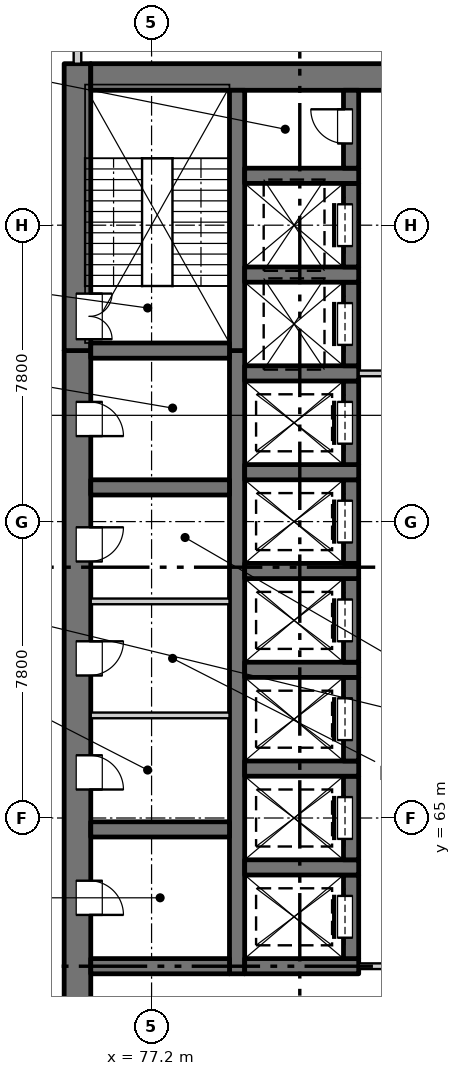
"""IFC4 building model, lengths in metres.
Left out: names, types, materials, properties, quantities, classifications, styles, units other than length and angle.
Written with IfcOpenShell. Run it as: python <this file> out.ifc"""

import sys

from ifc_helpers import new_model, si_unit, direction, frame, frame_2d, origin, place, context, subcontext, project, spatial, rectangle, extrude, element, fill, save


model = new_model("IFC4")
c1 = context("Model", 3, precision=1e-05, world=origin(), true_north=direction((0.0, 1.0)))
c2 = subcontext(c1, "Body", "Model", "MODEL_VIEW")
j1 = project(units=[si_unit("LENGTHUNIT", "METRE"), si_unit("PLANEANGLEUNIT", "RADIAN")], contexts=[c1])
p1 = place(None, origin())
s1 = spatial("IfcSite", under=j1, at=p1, CompositionType="ELEMENT")
p2 = place(p1, origin())
s2 = spatial("IfcBuilding", under=s1, at=p2, CompositionType="ELEMENT")
p3 = place(p2, frame((0.0, 0.0, 10.5)))
s3 = spatial("IfcBuildingStorey", under=s2, at=p3, CompositionType="ELEMENT", Elevation=10.5)
p4 = place(p3, frame((75.25, 54.9, -0.3), z_axis=(0.0, 0.0, 1.0), x_axis=(0.0, 1.0, 0.0)))
e1 = element("IfcWall", 1, at=p4, inside=s3, PredefinedType="SOLIDWALL", context=c2, shape_type="SweptSolid", body=[
    extrude(rectangle(XDim=22.4, YDim=0.7, at=frame_2d((11.2, 0.0))), origin(), (0.0, 0.0, 1.0), 4.45),
])
p5 = place(p4, frame((7.55, 0.0, 0.3)))
e2 = element("IfcOpeningElement", 2, at=p5, cuts=e1, PredefinedType="OPENING", context=c2, shape_type="SweptSolid", body=[
    extrude(rectangle(XDim=0.9, YDim=2.1, at=frame_2d((0.45, 1.05))), frame((0.0, 0.36, 0.0), z_axis=(0.0, -1.0, 0.0), x_axis=(1.0, 0.0, 0.0)), (0.0, 0.0, 1.0), 0.72),
])
p6 = place(p4, frame((10.85, 0.0, 0.3)))
e3 = element("IfcOpeningElement", 3, at=p6, cuts=e1, PredefinedType="OPENING", context=c2, shape_type="SweptSolid", body=[
    extrude(rectangle(XDim=0.9, YDim=2.1, at=frame_2d((0.45, 1.05))), frame((0.0, 0.36, 0.0), z_axis=(0.0, -1.0, 0.0), x_axis=(1.0, 0.0, 0.0)), (0.0, 0.0, 1.0), 0.72),
])
p7 = place(p4, frame((13.85, 0.0, 0.3)))
e4 = element("IfcOpeningElement", 4, at=p7, cuts=e1, PredefinedType="OPENING", context=c2, shape_type="SweptSolid", body=[
    extrude(rectangle(XDim=0.9, YDim=2.1, at=frame_2d((0.45, 1.05))), frame((0.0, 0.36, 0.0), z_axis=(0.0, -1.0, 0.0), x_axis=(1.0, 0.0, 0.0)), (0.0, 0.0, 1.0), 0.72),
])
p8 = place(p4, frame((16.85, 0.0, 0.3)))
e5 = element("IfcOpeningElement", 5, at=p8, cuts=e1, PredefinedType="OPENING", context=c2, shape_type="SweptSolid", body=[
    extrude(rectangle(XDim=0.9, YDim=2.1, at=frame_2d((0.45, 1.05))), frame((0.0, 0.36, 0.0), z_axis=(0.0, -1.0, 0.0), x_axis=(1.0, 0.0, 0.0)), (0.0, 0.0, 1.0), 0.72),
])
p9 = place(p4, frame((20.15, 0.0, 0.3)))
e6 = element("IfcOpeningElement", 6, at=p9, cuts=e1, PredefinedType="OPENING", context=c2, shape_type="SweptSolid", body=[
    extrude(rectangle(XDim=0.9, YDim=2.1, at=frame_2d((0.45, 1.05))), frame((0.0, 0.36, 0.0), z_axis=(0.0, -1.0, 0.0), x_axis=(1.0, 0.0, 0.0)), (0.0, 0.0, 1.0), 0.72),
])
p10 = place(p3, frame((75.25, 77.3, -0.3), z_axis=(0.0, 0.0, 1.0), x_axis=(0.0, 1.0, 0.0)))
e7 = element("IfcWall", 7, at=p10, inside=s3, PredefinedType="SOLIDWALL", context=c2, shape_type="SweptSolid", body=[
    extrude(rectangle(XDim=7.55, YDim=0.7, at=frame_2d((3.775, 0.0))), origin(), (0.0, 0.0, 1.0), 4.45),
])
p11 = place(p10, frame((0.3, 0.0, 0.3)))
e8 = element("IfcOpeningElement", 8, at=p11, cuts=e7, PredefinedType="OPENING", context=c2, shape_type="SweptSolid", body=[
    extrude(rectangle(XDim=1.2, YDim=2.1, at=frame_2d((0.6, 1.05))), frame((0.0, 0.36, 0.0), z_axis=(0.0, -1.0, 0.0), x_axis=(1.0, 0.0, 0.0)), (0.0, 0.0, 1.0), 0.72),
])
p12 = place(p3, frame((75.6, 84.5, -0.3), z_axis=(0.0, 0.0, 1.0), x_axis=(1.0, 0.0, 0.0)))
e9 = element("IfcWall", 9, at=p12, inside=s3, PredefinedType="SOLIDWALL", context=c2, shape_type="SweptSolid", body=[
    extrude(rectangle(XDim=18.8, YDim=0.7, at=frame_2d((9.4, 0.0))), origin(), (0.0, 0.0, 1.0), 4.45),
])
p13 = place(p3, frame((79.45, 60.9, -0.3), z_axis=(0.0, 0.0, 1.0), x_axis=(0.0, 1.0, 0.0)))
e10 = element("IfcWall", 10, at=p13, inside=s3, PredefinedType="SOLIDWALL", context=c2, shape_type="SweptSolid", body=[
    extrude(rectangle(XDim=16.4, YDim=0.4, at=frame_2d((8.2, 0.0))), origin(), (0.0, 0.0, 1.0), 4.45),
])
p14 = place(p3, frame((79.45, 77.3, -0.3), z_axis=(0.0, 0.0, 1.0), x_axis=(0.0, 1.0, 0.0)))
e11 = element("IfcWall", 11, at=p14, inside=s3, PredefinedType="SOLIDWALL", context=c2, shape_type="SweptSolid", body=[
    extrude(rectangle(XDim=6.85, YDim=0.4, at=frame_2d((3.425, 0.0))), origin(), (0.0, 0.0, 1.0), 4.45),
])
p15 = place(p3, frame((79.65, 61.1, -0.3), z_axis=(0.0, 0.0, 1.0), x_axis=(1.0, 0.0, 0.0)))
e12 = element("IfcWall", 12, at=p15, inside=s3, PredefinedType="SOLIDWALL", context=c2, shape_type="SweptSolid", body=[
    extrude(rectangle(XDim=3.0, YDim=0.4, at=frame_2d((1.5, 0.0))), origin(), (0.0, 0.0, 1.0), 4.45),
])
p16 = place(p3, frame((82.45, 61.3, -0.3), z_axis=(0.0, 0.0, 1.0), x_axis=(0.0, 1.0, 0.0)))
e13 = element("IfcWall", 13, at=p16, inside=s3, PredefinedType="SOLIDWALL", context=c2, shape_type="SweptSolid", body=[
    extrude(rectangle(XDim=2.2, YDim=0.4, at=frame_2d((1.1, 0.0))), origin(), (0.0, 0.0, 1.0), 4.45),
])
p17 = place(p16, frame((0.55, 0.0, 0.3)))
e14 = element("IfcOpeningElement", 14, at=p17, cuts=e13, PredefinedType="OPENING", context=c2, shape_type="SweptSolid", body=[
    extrude(rectangle(XDim=1.1, YDim=2.1, at=frame_2d((0.55, 1.05))), frame((0.0, 0.21, 0.0), z_axis=(0.0, -1.0, 0.0), x_axis=(1.0, 0.0, 0.0)), (0.0, 0.0, 1.0), 0.42),
])
p18 = place(p3, frame((79.65, 63.7, -0.3), z_axis=(0.0, 0.0, 1.0), x_axis=(1.0, 0.0, 0.0)))
e15 = element("IfcWall", 15, at=p18, inside=s3, PredefinedType="SOLIDWALL", context=c2, shape_type="SweptSolid", body=[
    extrude(rectangle(XDim=3.0, YDim=0.4, at=frame_2d((1.5, 0.0))), origin(), (0.0, 0.0, 1.0), 4.45),
])
p19 = place(p3, frame((82.45, 63.9, -0.3), z_axis=(0.0, 0.0, 1.0), x_axis=(0.0, 1.0, 0.0)))
e16 = element("IfcWall", 16, at=p19, inside=s3, PredefinedType="SOLIDWALL", context=c2, shape_type="SweptSolid", body=[
    extrude(rectangle(XDim=2.2, YDim=0.4, at=frame_2d((1.1, 0.0))), origin(), (0.0, 0.0, 1.0), 4.45),
])
p20 = place(p19, frame((0.55, 0.0, 0.3)))
e17 = element("IfcOpeningElement", 17, at=p20, cuts=e16, PredefinedType="OPENING", context=c2, shape_type="SweptSolid", body=[
    extrude(rectangle(XDim=1.1, YDim=2.1, at=frame_2d((0.55, 1.05))), frame((0.0, 0.21, 0.0), z_axis=(0.0, -1.0, 0.0), x_axis=(1.0, 0.0, 0.0)), (0.0, 0.0, 1.0), 0.42),
])
p21 = place(p3, frame((79.65, 66.3, -0.3), z_axis=(0.0, 0.0, 1.0), x_axis=(1.0, 0.0, 0.0)))
e18 = element("IfcWall", 18, at=p21, inside=s3, PredefinedType="SOLIDWALL", context=c2, shape_type="SweptSolid", body=[
    extrude(rectangle(XDim=3.0, YDim=0.4, at=frame_2d((1.5, 0.0))), origin(), (0.0, 0.0, 1.0), 4.45),
])
p22 = place(p3, frame((82.45, 66.5, -0.3), z_axis=(0.0, 0.0, 1.0), x_axis=(0.0, 1.0, 0.0)))
e19 = element("IfcWall", 19, at=p22, inside=s3, PredefinedType="SOLIDWALL", context=c2, shape_type="SweptSolid", body=[
    extrude(rectangle(XDim=2.2, YDim=0.4, at=frame_2d((1.1, 0.0))), origin(), (0.0, 0.0, 1.0), 4.45),
])
p23 = place(p22, frame((0.55, 0.0, 0.3)))
e20 = element("IfcOpeningElement", 20, at=p23, cuts=e19, PredefinedType="OPENING", context=c2, shape_type="SweptSolid", body=[
    extrude(rectangle(XDim=1.1, YDim=2.1, at=frame_2d((0.55, 1.05))), frame((0.0, 0.21, 0.0), z_axis=(0.0, -1.0, 0.0), x_axis=(1.0, 0.0, 0.0)), (0.0, 0.0, 1.0), 0.42),
])
p24 = place(p3, frame((79.65, 68.9, -0.3), z_axis=(0.0, 0.0, 1.0), x_axis=(1.0, 0.0, 0.0)))
e21 = element("IfcWall", 21, at=p24, inside=s3, PredefinedType="SOLIDWALL", context=c2, shape_type="SweptSolid", body=[
    extrude(rectangle(XDim=3.0, YDim=0.4, at=frame_2d((1.5, 0.0))), origin(), (0.0, 0.0, 1.0), 4.45),
])
p25 = place(p3, frame((82.45, 69.1, -0.3), z_axis=(0.0, 0.0, 1.0), x_axis=(0.0, 1.0, 0.0)))
e22 = element("IfcWall", 22, at=p25, inside=s3, PredefinedType="SOLIDWALL", context=c2, shape_type="SweptSolid", body=[
    extrude(rectangle(XDim=2.2, YDim=0.4, at=frame_2d((1.1, 0.0))), origin(), (0.0, 0.0, 1.0), 4.45),
])
p26 = place(p25, frame((0.55, 0.0, 0.3)))
e23 = element("IfcOpeningElement", 23, at=p26, cuts=e22, PredefinedType="OPENING", context=c2, shape_type="SweptSolid", body=[
    extrude(rectangle(XDim=1.1, YDim=2.1, at=frame_2d((0.55, 1.05))), frame((0.0, 0.21, 0.0), z_axis=(0.0, -1.0, 0.0), x_axis=(1.0, 0.0, 0.0)), (0.0, 0.0, 1.0), 0.42),
])
p27 = place(p3, frame((79.65, 71.5, -0.3), z_axis=(0.0, 0.0, 1.0), x_axis=(1.0, 0.0, 0.0)))
e24 = element("IfcWall", 24, at=p27, inside=s3, PredefinedType="SOLIDWALL", context=c2, shape_type="SweptSolid", body=[
    extrude(rectangle(XDim=3.0, YDim=0.4, at=frame_2d((1.5, 0.0))), origin(), (0.0, 0.0, 1.0), 4.45),
])
p28 = place(p3, frame((82.45, 71.7, -0.3), z_axis=(0.0, 0.0, 1.0), x_axis=(0.0, 1.0, 0.0)))
e25 = element("IfcWall", 25, at=p28, inside=s3, PredefinedType="SOLIDWALL", context=c2, shape_type="SweptSolid", body=[
    extrude(rectangle(XDim=2.2, YDim=0.4, at=frame_2d((1.1, 0.0))), origin(), (0.0, 0.0, 1.0), 4.45),
])
p29 = place(p28, frame((0.55, 0.0, 0.3)))
e26 = element("IfcOpeningElement", 26, at=p29, cuts=e25, PredefinedType="OPENING", context=c2, shape_type="SweptSolid", body=[
    extrude(rectangle(XDim=1.1, YDim=2.1, at=frame_2d((0.55, 1.05))), frame((0.0, 0.21, 0.0), z_axis=(0.0, -1.0, 0.0), x_axis=(1.0, 0.0, 0.0)), (0.0, 0.0, 1.0), 0.42),
])
p30 = place(p3, frame((79.65, 74.1, -0.3), z_axis=(0.0, 0.0, 1.0), x_axis=(1.0, 0.0, 0.0)))
e27 = element("IfcWall", 27, at=p30, inside=s3, PredefinedType="SOLIDWALL", context=c2, shape_type="SweptSolid", body=[
    extrude(rectangle(XDim=3.0, YDim=0.4, at=frame_2d((1.5, 0.0))), origin(), (0.0, 0.0, 1.0), 4.45),
])
p31 = place(p3, frame((82.45, 74.3, -0.3), z_axis=(0.0, 0.0, 1.0), x_axis=(0.0, 1.0, 0.0)))
e28 = element("IfcWall", 28, at=p31, inside=s3, PredefinedType="SOLIDWALL", context=c2, shape_type="SweptSolid", body=[
    extrude(rectangle(XDim=2.2, YDim=0.4, at=frame_2d((1.1, 0.0))), origin(), (0.0, 0.0, 1.0), 4.45),
])
p32 = place(p31, frame((0.55, 0.0, 0.3)))
e29 = element("IfcOpeningElement", 29, at=p32, cuts=e28, PredefinedType="OPENING", context=c2, shape_type="SweptSolid", body=[
    extrude(rectangle(XDim=1.1, YDim=2.1, at=frame_2d((0.55, 1.05))), frame((0.0, 0.21, 0.0), z_axis=(0.0, -1.0, 0.0), x_axis=(1.0, 0.0, 0.0)), (0.0, 0.0, 1.0), 0.42),
])
p33 = place(p3, frame((79.65, 76.7, -0.3), z_axis=(0.0, 0.0, 1.0), x_axis=(1.0, 0.0, 0.0)))
e30 = element("IfcWall", 30, at=p33, inside=s3, PredefinedType="SOLIDWALL", context=c2, shape_type="SweptSolid", body=[
    extrude(rectangle(XDim=3.0, YDim=0.4, at=frame_2d((1.5, 0.0))), origin(), (0.0, 0.0, 1.0), 4.45),
])
p34 = place(p3, frame((82.45, 76.9, -0.3), z_axis=(0.0, 0.0, 1.0), x_axis=(0.0, 1.0, 0.0)))
e31 = element("IfcWall", 31, at=p34, inside=s3, PredefinedType="SOLIDWALL", context=c2, shape_type="SweptSolid", body=[
    extrude(rectangle(XDim=2.2, YDim=0.4, at=frame_2d((1.1, 0.0))), origin(), (0.0, 0.0, 1.0), 4.45),
])
p35 = place(p34, frame((0.55, 0.0, 0.3)))
e32 = element("IfcOpeningElement", 32, at=p35, cuts=e31, PredefinedType="OPENING", context=c2, shape_type="SweptSolid", body=[
    extrude(rectangle(XDim=1.1, YDim=2.1, at=frame_2d((0.55, 1.05))), frame((0.0, 0.21, 0.0), z_axis=(0.0, -1.0, 0.0), x_axis=(1.0, 0.0, 0.0)), (0.0, 0.0, 1.0), 0.42),
])
p36 = place(p3, frame((79.65, 79.3, -0.3), z_axis=(0.0, 0.0, 1.0), x_axis=(1.0, 0.0, 0.0)))
e33 = element("IfcWall", 33, at=p36, inside=s3, PredefinedType="SOLIDWALL", context=c2, shape_type="SweptSolid", body=[
    extrude(rectangle(XDim=3.0, YDim=0.4, at=frame_2d((1.5, 0.0))), origin(), (0.0, 0.0, 1.0), 4.45),
])
p37 = place(p3, frame((82.45, 79.5, -0.3), z_axis=(0.0, 0.0, 1.0), x_axis=(0.0, 1.0, 0.0)))
e34 = element("IfcWall", 34, at=p37, inside=s3, PredefinedType="SOLIDWALL", context=c2, shape_type="SweptSolid", body=[
    extrude(rectangle(XDim=2.2, YDim=0.4, at=frame_2d((1.1, 0.0))), origin(), (0.0, 0.0, 1.0), 4.45),
])
p38 = place(p37, frame((0.55, 0.0, 0.3)))
e35 = element("IfcOpeningElement", 35, at=p38, cuts=e34, PredefinedType="OPENING", context=c2, shape_type="SweptSolid", body=[
    extrude(rectangle(XDim=1.1, YDim=2.1, at=frame_2d((0.55, 1.05))), frame((0.0, 0.21, 0.0), z_axis=(0.0, -1.0, 0.0), x_axis=(1.0, 0.0, 0.0)), (0.0, 0.0, 1.0), 0.42),
])
p39 = place(p3, frame((79.65, 81.9, -0.3), z_axis=(0.0, 0.0, 1.0), x_axis=(1.0, 0.0, 0.0)))
e36 = element("IfcWall", 36, at=p39, inside=s3, PredefinedType="SOLIDWALL", context=c2, shape_type="SweptSolid", body=[
    extrude(rectangle(XDim=3.0, YDim=0.4, at=frame_2d((1.5, 0.0))), origin(), (0.0, 0.0, 1.0), 4.45),
])
p40 = place(p3, frame((82.45, 82.1, -0.3), z_axis=(0.0, 0.0, 1.0), x_axis=(0.0, 1.0, 0.0)))
e37 = element("IfcWall", 37, at=p40, inside=s3, PredefinedType="SOLIDWALL", context=c2, shape_type="SweptSolid", body=[
    extrude(rectangle(XDim=2.05, YDim=0.4, at=frame_2d((1.025, 0.0))), origin(), (0.0, 0.0, 1.0), 4.45),
])
p41 = place(p40, frame((0.65, 0.0, 0.3)))
e38 = element("IfcOpeningElement", 38, at=p41, cuts=e37, PredefinedType="OPENING", context=c2, shape_type="SweptSolid", body=[
    extrude(rectangle(XDim=0.9, YDim=2.1, at=frame_2d((0.45, 1.05))), frame((0.0, 0.21, 0.0), z_axis=(0.0, -1.0, 0.0), x_axis=(1.0, 0.0, 0.0)), (0.0, 0.0, 1.0), 0.42),
])
for number, where, z_axis, x_axis in (
    (39, (75.6, 61.1, -0.3), (0.0, 0.0, 1.0), (1.0, 0.0, 0.0)),
    (40, (75.6, 64.7, -0.3), (0.0, 0.0, 1.0), (1.0, 0.0, 0.0)),
    (41, (75.6, 73.7, -0.3), (0.0, 0.0, 1.0), (1.0, 0.0, 0.0)),
    (42, (75.6, 77.3, -0.3), (0.0, 0.0, 1.0), (1.0, 0.0, 0.0)),
):
    element("IfcWall", number, at=place(p3, frame(where, z_axis=z_axis, x_axis=x_axis)), inside=s3, PredefinedType="SOLIDWALL", context=c2, shape_type="SweptSolid", body=[
        extrude(rectangle(XDim=3.65, YDim=0.4, at=frame_2d((1.825, 0.0))), origin(), (0.0, 0.0, 1.0), 4.45),
    ])
p42 = place(p3, frame((82.65, 61.1, 0.0), z_axis=(0.0, 0.0, 1.0), x_axis=(1.0, 0.0, 0.0)))
e43 = element("IfcWall", 43, at=p42, inside=s3, PredefinedType="PARTITIONING", context=c2, shape_type="SweptSolid", body=[
    extrude(rectangle(XDim=4.7, YDim=0.15, at=frame_2d((2.35, 0.0))), origin(), (0.0, 0.0, 1.0), 4.15),
])
p43 = place(p42, frame((1.45, 0.0, 0.0)))
e44 = element("IfcOpeningElement", 44, at=p43, cuts=e43, PredefinedType="OPENING", context=c2, shape_type="SweptSolid", body=[
    extrude(rectangle(XDim=1.8, YDim=2.1, at=frame_2d((0.9, 1.05))), frame((0.0, 0.085, 0.0), z_axis=(0.0, -1.0, 0.0), x_axis=(1.0, 0.0, 0.0)), (0.0, 0.0, 1.0), 0.17),
])
for number, where, z_axis, x_axis in (
    (45, (75.6, 67.7, 0.0), (0.0, 0.0, 1.0), (1.0, 0.0, 0.0)),
    (46, (75.6, 70.7, 0.0), (0.0, 0.0, 1.0), (1.0, 0.0, 0.0)),
):
    element("IfcWall", number, at=place(p3, frame(where, z_axis=z_axis, x_axis=x_axis)), inside=s3, PredefinedType="PARTITIONING", context=c2, shape_type="SweptSolid", body=[
        extrude(rectangle(XDim=3.65, YDim=0.15, at=frame_2d((1.825, 0.0))), origin(), (0.0, 0.0, 1.0), 4.15),
    ])
p44 = place(p3, frame((82.65, 76.7, 0.0), z_axis=(0.0, 0.0, 1.0), x_axis=(1.0, 0.0, 0.0)))
e47 = element("IfcWall", 47, at=p44, inside=s3, PredefinedType="PARTITIONING", context=c2, shape_type="SweptSolid", body=[
    extrude(rectangle(XDim=4.7, YDim=0.15, at=frame_2d((2.35, 0.0))), origin(), (0.0, 0.0, 1.0), 4.15),
])
p45 = place(p44, frame((1.45, 0.0, 0.0)))
e48 = element("IfcOpeningElement", 48, at=p45, cuts=e47, PredefinedType="OPENING", context=c2, shape_type="SweptSolid", body=[
    extrude(rectangle(XDim=1.8, YDim=2.1, at=frame_2d((0.9, 1.05))), frame((0.0, 0.085, 0.0), z_axis=(0.0, -1.0, 0.0), x_axis=(1.0, 0.0, 0.0)), (0.0, 0.0, 1.0), 0.17),
])
p46 = place(p3, frame((75.25, 84.85, 0.0), z_axis=(0.0, 0.0, 1.0), x_axis=(0.0, 1.0, 0.0)))
e49 = element("IfcWall", 49, at=p46, inside=s3, PredefinedType="PARTITIONING", context=c2, shape_type="SweptSolid", body=[
    extrude(rectangle(XDim=3.25, YDim=0.2, at=frame_2d((1.625, 0.0))), origin(), (0.0, 0.0, 1.0), 4.15),
])
p47 = place(p46, frame((1.15, 0.0, 0.0)))
e50 = element("IfcOpeningElement", 50, at=p47, cuts=e49, PredefinedType="OPENING", context=c2, shape_type="SweptSolid", body=[
    extrude(rectangle(XDim=0.9, YDim=2.1, at=frame_2d((0.45, 1.05))), frame((0.0, 0.11, 0.0), z_axis=(0.0, -1.0, 0.0), x_axis=(1.0, 0.0, 0.0)), (0.0, 0.0, 1.0), 0.22),
])
p48 = place(p17, origin())
e51 = element("IfcDoor", 51, at=p48, inside=s3, OperationType="SLIDING_TO_RIGHT", PredefinedType="DOOR", context=c2, shape_type="SweptSolid", body=[
    extrude(rectangle(XDim=1.1, YDim=2.1, at=frame_2d((0.55, 1.05))), frame((0.0, 0.185, 0.0), z_axis=(0.0, -1.0, 0.0), x_axis=(1.0, 0.0, 0.0)), (0.0, 0.0, 1.0), 0.05),
])
fill(e14, e51)
p49 = place(p5, origin())
e52 = element("IfcDoor", 52, at=p49, inside=s3, OperationType="SINGLE_SWING_RIGHT", PredefinedType="DOOR", context=c2, shape_type="SweptSolid", body=[
    extrude(rectangle(XDim=0.9, YDim=2.1, at=frame_2d((0.45, 1.05))), frame((0.0, -0.285, 0.0), z_axis=(0.0, -1.0, 0.0), x_axis=(1.0, 0.0, 0.0)), (0.0, 0.0, 1.0), 0.05),
])
fill(e2, e52)
p50 = place(p20, origin())
e53 = element("IfcDoor", 53, at=p50, inside=s3, OperationType="SLIDING_TO_RIGHT", PredefinedType="DOOR", context=c2, shape_type="SweptSolid", body=[
    extrude(rectangle(XDim=1.1, YDim=2.1, at=frame_2d((0.55, 1.05))), frame((0.0, 0.185, 0.0), z_axis=(0.0, -1.0, 0.0), x_axis=(1.0, 0.0, 0.0)), (0.0, 0.0, 1.0), 0.05),
])
fill(e17, e53)
p51 = place(p6, origin())
e54 = element("IfcDoor", 54, at=p51, inside=s3, OperationType="SINGLE_SWING_RIGHT", PredefinedType="DOOR", context=c2, shape_type="SweptSolid", body=[
    extrude(rectangle(XDim=0.9, YDim=2.1, at=frame_2d((0.45, 1.05))), frame((0.0, -0.285, 0.0), z_axis=(0.0, -1.0, 0.0), x_axis=(1.0, 0.0, 0.0)), (0.0, 0.0, 1.0), 0.05),
])
fill(e3, e54)
p52 = place(p23, origin())
e55 = element("IfcDoor", 55, at=p52, inside=s3, OperationType="SLIDING_TO_RIGHT", PredefinedType="DOOR", context=c2, shape_type="SweptSolid", body=[
    extrude(rectangle(XDim=1.1, YDim=2.1, at=frame_2d((0.55, 1.05))), frame((0.0, 0.185, 0.0), z_axis=(0.0, -1.0, 0.0), x_axis=(1.0, 0.0, 0.0)), (0.0, 0.0, 1.0), 0.05),
])
fill(e20, e55)
p53 = place(p7, origin())
e56 = element("IfcDoor", 56, at=p53, inside=s3, OperationType="SINGLE_SWING_LEFT", PredefinedType="DOOR", context=c2, shape_type="SweptSolid", body=[
    extrude(rectangle(XDim=0.9, YDim=2.1, at=frame_2d((0.45, 1.05))), frame((0.0, -0.285, 0.0), z_axis=(0.0, -1.0, 0.0), x_axis=(1.0, 0.0, 0.0)), (0.0, 0.0, 1.0), 0.05),
])
fill(e4, e56)
p54 = place(p26, origin())
e57 = element("IfcDoor", 57, at=p54, inside=s3, OperationType="SLIDING_TO_LEFT", PredefinedType="DOOR", context=c2, shape_type="SweptSolid", body=[
    extrude(rectangle(XDim=1.1, YDim=2.1, at=frame_2d((0.55, 1.05))), frame((0.0, 0.185, 0.0), z_axis=(0.0, -1.0, 0.0), x_axis=(1.0, 0.0, 0.0)), (0.0, 0.0, 1.0), 0.05),
])
fill(e23, e57)
p55 = place(p8, origin())
e58 = element("IfcDoor", 58, at=p55, inside=s3, OperationType="SINGLE_SWING_LEFT", PredefinedType="DOOR", context=c2, shape_type="SweptSolid", body=[
    extrude(rectangle(XDim=0.9, YDim=2.1, at=frame_2d((0.45, 1.05))), frame((0.0, -0.285, 0.0), z_axis=(0.0, -1.0, 0.0), x_axis=(1.0, 0.0, 0.0)), (0.0, 0.0, 1.0), 0.05),
])
fill(e5, e58)
p56 = place(p29, origin())
e59 = element("IfcDoor", 59, at=p56, inside=s3, OperationType="SLIDING_TO_LEFT", PredefinedType="DOOR", context=c2, shape_type="SweptSolid", body=[
    extrude(rectangle(XDim=1.1, YDim=2.1, at=frame_2d((0.55, 1.05))), frame((0.0, 0.185, 0.0), z_axis=(0.0, -1.0, 0.0), x_axis=(1.0, 0.0, 0.0)), (0.0, 0.0, 1.0), 0.05),
])
fill(e26, e59)
p57 = place(p32, origin())
e60 = element("IfcDoor", 60, at=p57, inside=s3, OperationType="SLIDING_TO_LEFT", PredefinedType="DOOR", context=c2, shape_type="SweptSolid", body=[
    extrude(rectangle(XDim=1.1, YDim=2.1, at=frame_2d((0.55, 1.05))), frame((0.0, 0.185, 0.0), z_axis=(0.0, -1.0, 0.0), x_axis=(1.0, 0.0, 0.0)), (0.0, 0.0, 1.0), 0.05),
])
fill(e29, e60)
p58 = place(p9, origin())
e61 = element("IfcDoor", 61, at=p58, inside=s3, OperationType="SINGLE_SWING_RIGHT", PredefinedType="DOOR", context=c2, shape_type="SweptSolid", body=[
    extrude(rectangle(XDim=0.9, YDim=2.1, at=frame_2d((0.45, 1.05))), frame((0.0, -0.285, 0.0), z_axis=(0.0, -1.0, 0.0), x_axis=(1.0, 0.0, 0.0)), (0.0, 0.0, 1.0), 0.05),
])
fill(e6, e61)
p59 = place(p35, origin())
e62 = element("IfcDoor", 62, at=p59, inside=s3, OperationType="SLIDING_TO_LEFT", PredefinedType="DOOR", context=c2, shape_type="SweptSolid", body=[
    extrude(rectangle(XDim=1.1, YDim=2.1, at=frame_2d((0.55, 1.05))), frame((0.0, 0.185, 0.0), z_axis=(0.0, -1.0, 0.0), x_axis=(1.0, 0.0, 0.0)), (0.0, 0.0, 1.0), 0.05),
])
fill(e32, e62)
p60 = place(p11, origin())
e63 = element("IfcDoor", 63, at=p60, inside=s3, OperationType="DOUBLE_DOOR_SINGLE_SWING", PredefinedType="DOOR", context=c2, shape_type="SweptSolid", body=[
    extrude(rectangle(XDim=1.2, YDim=2.1, at=frame_2d((0.6, 1.05))), frame((0.0, -0.285, 0.0), z_axis=(0.0, -1.0, 0.0), x_axis=(1.0, 0.0, 0.0)), (0.0, 0.0, 1.0), 0.05),
])
fill(e8, e63)
p61 = place(p38, origin())
e64 = element("IfcDoor", 64, at=p61, inside=s3, OperationType="SLIDING_TO_LEFT", PredefinedType="DOOR", context=c2, shape_type="SweptSolid", body=[
    extrude(rectangle(XDim=1.1, YDim=2.1, at=frame_2d((0.55, 1.05))), frame((0.0, 0.185, 0.0), z_axis=(0.0, -1.0, 0.0), x_axis=(1.0, 0.0, 0.0)), (0.0, 0.0, 1.0), 0.05),
])
fill(e35, e64)
p62 = place(p41, origin())
e65 = element("IfcDoor", 65, at=p62, inside=s3, OperationType="SINGLE_SWING_RIGHT", PredefinedType="DOOR", context=c2, shape_type="SweptSolid", body=[
    extrude(rectangle(XDim=0.9, YDim=2.1, at=frame_2d((0.45, 1.05))), frame((0.0, 0.185, 0.0), z_axis=(0.0, -1.0, 0.0), x_axis=(1.0, 0.0, 0.0)), (0.0, 0.0, 1.0), 0.05),
])
fill(e38, e65)
save(model, sys.argv[1])
